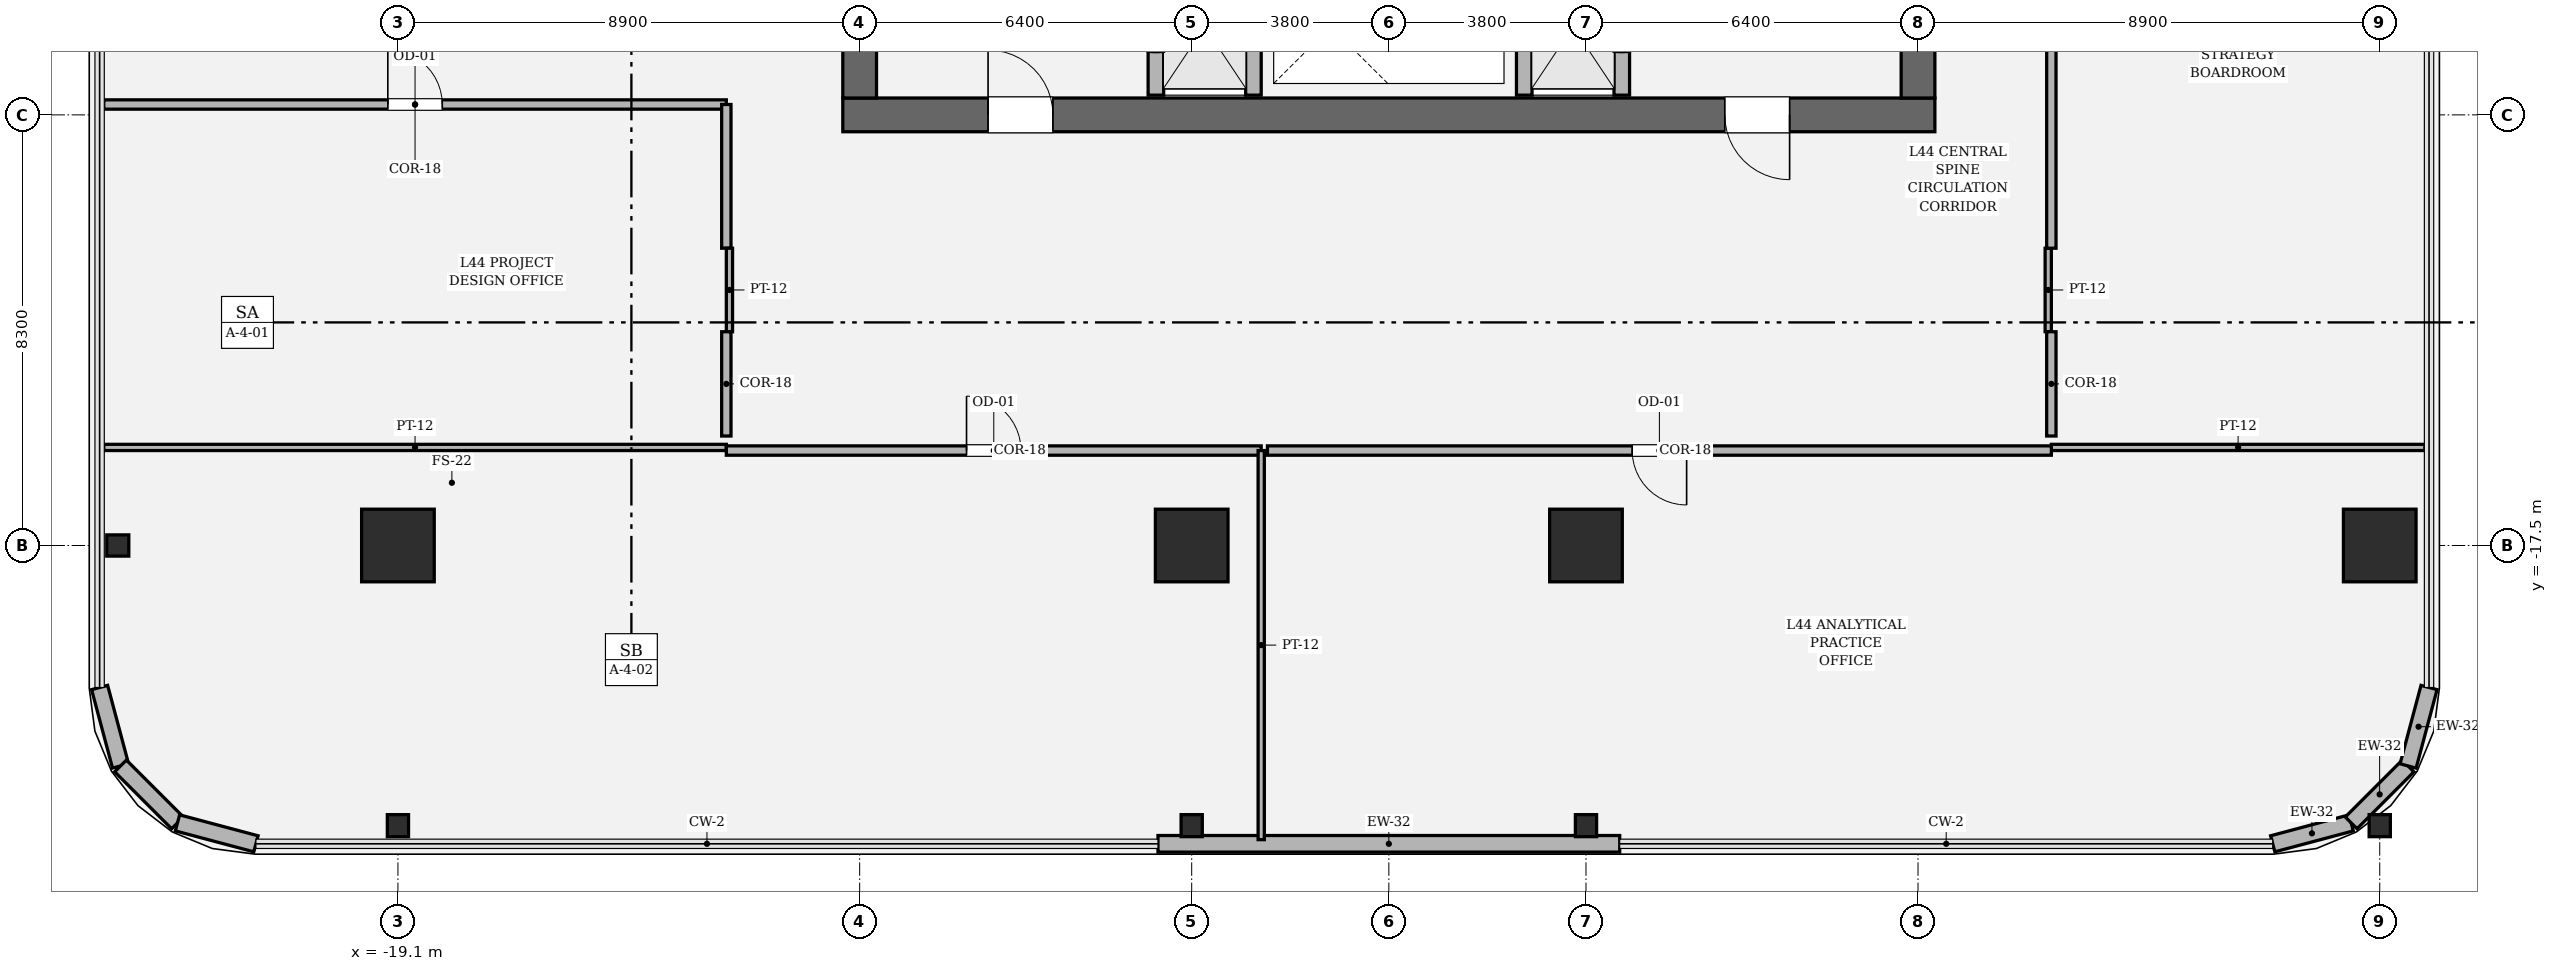
"""IFC4 building model, lengths in metres.
Left out: names, types, materials, properties, quantities, classifications, styles, units other than length and angle.
Written with IfcOpenShell. Run it as: python <this file> out.ifc"""

import sys

from ifc_helpers import new_model, si_unit, direction, frame, frame_2d, origin, origin_2d, place, context, subcontext, project, spatial, rectangle, hollow_rectangle, i_section, extrude, element, fill, save


model = new_model("IFC4")
c1 = context("Model", 3, precision=1e-05, world=origin(), true_north=direction((0.0, 1.0)))
c2 = subcontext(c1, "Body", "Model", "MODEL_VIEW")
j1 = project(units=[si_unit("LENGTHUNIT", "METRE"), si_unit("PLANEANGLEUNIT", "RADIAN")], contexts=[c1])
p1 = place(None, origin())
s1 = spatial("IfcSite", under=j1, at=p1, CompositionType="ELEMENT")
p2 = place(p1, origin())
s2 = spatial("IfcBuilding", under=s1, at=p2, CompositionType="ELEMENT")
p3 = place(p2, frame((0.0, 0.0, 188.4)))
s3 = spatial("IfcBuildingStorey", under=s2, at=p3, CompositionType="ELEMENT", Elevation=188.4)
p4 = place(p3, frame((10.525, -9.2, 0.0), z_axis=(0.0, 0.0, 1.0), x_axis=(-1.0, 0.0, 0.0)))
e1 = element("IfcWall", 1, at=p4, inside=s3, PredefinedType="SHEAR", context=c2, shape_type="SweptSolid", body=[
    extrude(rectangle(XDim=21.05, YDim=0.65, at=frame_2d((10.525, 0.0))), origin(), (0.0, 0.0, 1.0), 4.05),
])
p5 = place(p4, frame((2.8, 0.0, 0.0)))
e2 = element("IfcOpeningElement", 2, at=p5, cuts=e1, PredefinedType="OPENING", context=c2, shape_type="SweptSolid", body=[
    extrude(rectangle(XDim=1.25, YDim=2.25, at=frame_2d((0.625, 1.125))), frame((0.0, 0.335, 0.0), z_axis=(0.0, -1.0, 0.0), x_axis=(1.0, 0.0, 0.0)), (0.0, 0.0, 1.0), 0.67),
])
p6 = place(p4, frame((17.0, 0.0, 0.0)))
e3 = element("IfcOpeningElement", 3, at=p6, cuts=e1, PredefinedType="OPENING", context=c2, shape_type="SweptSolid", body=[
    extrude(rectangle(XDim=1.25, YDim=2.25, at=frame_2d((0.625, 1.125))), frame((0.0, 0.335, 0.0), z_axis=(0.0, -1.0, 0.0), x_axis=(1.0, 0.0, 0.0)), (0.0, 0.0, 1.0), 0.67),
])
p7 = place(p3, frame((-10.2, -8.875, 0.0), z_axis=(0.0, 0.0, 1.0), x_axis=(0.0, 1.0, 0.0)))
e4 = element("IfcWall", 4, at=p7, inside=s3, PredefinedType="SHEAR", context=c2, shape_type="SweptSolid", body=[
    extrude(rectangle(XDim=17.75, YDim=0.65, at=frame_2d((8.875, 0.0))), origin(), (0.0, 0.0, 1.0), 4.05),
])
p8 = place(p7, frame((12.665, 0.0, 0.0)))
e5 = element("IfcOpeningElement", 5, at=p8, cuts=e4, PredefinedType="OPENING", context=c2, shape_type="SweptSolid", body=[
    extrude(rectangle(XDim=1.18, YDim=2.2, at=frame_2d((0.59, 1.1))), frame((0.0, 0.335, 0.0), z_axis=(0.0, -1.0, 0.0), x_axis=(1.0, 0.0, 0.0)), (0.0, 0.0, 1.0), 0.67),
])
p9 = place(p3, frame((10.2, 8.875, 0.0), z_axis=(0.0, 0.0, 1.0), x_axis=(0.0, -1.0, 0.0)))
e6 = element("IfcWall", 6, at=p9, inside=s3, PredefinedType="SHEAR", context=c2, shape_type="SweptSolid", body=[
    extrude(rectangle(XDim=17.75, YDim=0.65, at=frame_2d((8.875, 0.0))), origin(), (0.0, 0.0, 1.0), 4.05),
])
p10 = place(p9, frame((3.905, 0.0, 0.0)))
e7 = element("IfcOpeningElement", 7, at=p10, cuts=e6, PredefinedType="OPENING", context=c2, shape_type="SweptSolid", body=[
    extrude(rectangle(XDim=1.18, YDim=2.2, at=frame_2d((0.59, 1.1))), frame((0.0, 0.335, 0.0), z_axis=(0.0, -1.0, 0.0), x_axis=(1.0, 0.0, 0.0)), (0.0, 0.0, 1.0), 0.67),
])
for number, where, z_axis, x_axis in (
    (8, (-19.1, -17.5, 0.0), (0.0, 0.0, 1.0), (1.0, 0.0, 0.0)),
    (9, (-3.8, -17.5, 0.0), (0.0, 0.0, 1.0), (1.0, 0.0, 0.0)),
    (10, (3.8, -17.5, 0.0), (0.0, 0.0, 1.0), (1.0, 0.0, 0.0)),
    (11, (19.1, -17.5, 0.0), (0.0, 0.0, 1.0), (1.0, 0.0, 0.0)),
):
    element("IfcColumn", number, at=place(p3, frame(where, z_axis=z_axis, x_axis=x_axis)), inside=s3, PredefinedType="COLUMN", context=c2, shape_type="SweptSolid", body=[
        extrude(hollow_rectangle(XDim=1.4, YDim=1.4, WallThickness=0.042, at=origin_2d()), origin(), (0.0, 0.0, 1.0), 4.05),
    ])
for number, where, z_axis, x_axis in (
    (12, (-19.1, -22.9, 0.0), (0.0, 0.0, 1.0), (1.0, 0.0, 0.0)),
    (13, (-3.8, -22.9, 0.0), (0.0, 0.0, 1.0), (1.0, 0.0, 0.0)),
    (14, (3.8, -22.9, 0.0), (0.0, 0.0, 1.0), (1.0, 0.0, 0.0)),
    (15, (19.1, -22.9, 0.0), (0.0, 0.0, 1.0), (1.0, 0.0, 0.0)),
    (16, (-24.5, -17.5, 0.0), (0.0, 0.0, 1.0), (0.0, 1.0, 0.0)),
):
    element("IfcColumn", number, at=place(p3, frame(where, z_axis=z_axis, x_axis=x_axis)), inside=s3, PredefinedType="COLUMN", context=c2, shape_type="SweptSolid", body=[
        extrude(i_section(OverallWidth=0.409, OverallDepth=0.425, WebThickness=0.032, FlangeThickness=0.052, FilletRadius=0.018, at=origin_2d()), origin(), (0.0, 0.0, 1.0), 4.048),
    ])
p11 = place(p3, frame((-4.45, -23.25, 0.0), z_axis=(0.0, 0.0, 1.0), x_axis=(1.0, 0.0, 0.0)))
e17 = element("IfcWall", 17, at=p11, inside=s3, PredefinedType="SOLIDWALL", context=c2, shape_type="SweptSolid", body=[
    extrude(rectangle(XDim=8.9, YDim=0.32, at=frame_2d((4.45, 0.0))), origin(), (0.0, 0.0, 1.0), 2.544),
])
p12 = place(p3, frame((17.037, -23.25, 0.0), z_axis=(0.0, 0.0, 1.0), x_axis=(0.966224582397, 0.257701486942, 0.0)))
e18 = element("IfcWall", 18, at=p12, inside=s3, PredefinedType="SOLIDWALL", context=c2, shape_type="SweptSolid", body=[
    extrude(rectangle(XDim=1.565, YDim=0.32, at=frame_2d((0.783, 0.0))), origin(), (0.0, 0.0, 1.0), 2.544),
])
p13 = place(p3, frame((18.549, -22.847, 0.0), z_axis=(0.0, 0.0, 1.0), x_axis=(0.707028130747, 0.707185422879, 0.0)))
e19 = element("IfcWall", 19, at=p13, inside=s3, PredefinedType="SOLIDWALL", context=c2, shape_type="SweptSolid", body=[
    extrude(rectangle(XDim=1.552, YDim=0.32, at=frame_2d((0.776, 0.0))), origin(), (0.0, 0.0, 1.0), 2.504),
])
for number, where, z_axis, x_axis in (
    (20, (19.646, -21.749, 0.0), (0.0, 0.0, 1.0), (0.258, 0.966, 0.0)),
    (21, (-24.85, -20.237, 0.0), (0.0, 0.0, 1.0), (0.258, -0.966, 0.0)),
):
    element("IfcWall", number, at=place(p3, frame(where, z_axis=z_axis, x_axis=x_axis)), inside=s3, PredefinedType="SOLIDWALL", context=c2, shape_type="SweptSolid", body=[
        extrude(rectangle(XDim=1.565, YDim=0.32, at=frame_2d((0.783, 0.0))), origin(), (0.0, 0.0, 1.0), 3.83),
    ])
p14 = place(p3, frame((-24.447, -21.749, 0.0), z_axis=(0.0, 0.0, 1.0), x_axis=(0.707028130747, -0.707185422879, 0.0)))
e22 = element("IfcWall", 22, at=p14, inside=s3, PredefinedType="SOLIDWALL", context=c2, shape_type="SweptSolid", body=[
    extrude(rectangle(XDim=1.552, YDim=0.32, at=frame_2d((0.776, 0.0))), origin(), (0.0, 0.0, 1.0), 3.83),
])
p15 = place(p3, frame((-23.349, -22.847, 0.0), z_axis=(0.0, 0.0, 1.0), x_axis=(0.966224582397, -0.257701486942, 0.0)))
e23 = element("IfcWall", 23, at=p15, inside=s3, PredefinedType="SOLIDWALL", context=c2, shape_type="SweptSolid", body=[
    extrude(rectangle(XDim=1.565, YDim=0.32, at=frame_2d((0.783, 0.0))), origin(), (0.0, 0.0, 1.0), 3.83),
])
p16 = place(p3, frame((-4.49, -8.82, 0.0), z_axis=(0.0, 0.0, 1.0), x_axis=(0.0, 1.0, 0.0)))
e24 = element("IfcWall", 24, at=p16, inside=s3, PredefinedType="SOLIDWALL", context=c2, shape_type="SweptSolid", body=[
    extrude(rectangle(XDim=2.77, YDim=0.3, at=frame_2d((1.385, 0.0))), origin(), (0.0, 0.0, 1.0), 3.83),
])
p17 = place(p16, frame((0.825, 0.0, 0.0)))
e25 = element("IfcOpeningElement", 25, at=p17, cuts=e24, PredefinedType="OPENING", context=c2, shape_type="SweptSolid", body=[
    extrude(rectangle(XDim=1.12, YDim=2.25, at=frame_2d((0.56, 1.125))), frame((0.0, 0.16, 0.0), z_axis=(0.0, -1.0, 0.0), x_axis=(1.0, 0.0, 0.0)), (0.0, 0.0, 1.0), 0.32),
])
p18 = place(p3, frame((-2.61, -8.82, 0.0), z_axis=(0.0, 0.0, 1.0), x_axis=(0.0, 1.0, 0.0)))
e26 = element("IfcWall", 26, at=p18, inside=s3, PredefinedType="SOLIDWALL", context=c2, shape_type="SweptSolid", body=[
    extrude(rectangle(XDim=2.77, YDim=0.3, at=frame_2d((1.385, 0.0))), origin(), (0.0, 0.0, 1.0), 3.83),
])
p19 = place(p3, frame((4.49, -8.82, 0.0), z_axis=(0.0, 0.0, 1.0), x_axis=(0.0, 1.0, 0.0)))
e27 = element("IfcWall", 27, at=p19, inside=s3, PredefinedType="SOLIDWALL", context=c2, shape_type="SweptSolid", body=[
    extrude(rectangle(XDim=2.77, YDim=0.3, at=frame_2d((1.385, 0.0))), origin(), (0.0, 0.0, 1.0), 3.83),
])
p20 = place(p19, frame((0.825, 0.0, 0.0)))
e28 = element("IfcOpeningElement", 28, at=p20, cuts=e27, PredefinedType="OPENING", context=c2, shape_type="SweptSolid", body=[
    extrude(rectangle(XDim=1.12, YDim=2.25, at=frame_2d((0.56, 1.125))), frame((0.0, 0.16, 0.0), z_axis=(0.0, -1.0, 0.0), x_axis=(1.0, 0.0, 0.0)), (0.0, 0.0, 1.0), 0.32),
])
p21 = place(p3, frame((2.61, -8.82, 0.0), z_axis=(0.0, 0.0, 1.0), x_axis=(0.0, 1.0, 0.0)))
e29 = element("IfcWall", 29, at=p21, inside=s3, PredefinedType="SOLIDWALL", context=c2, shape_type="SweptSolid", body=[
    extrude(rectangle(XDim=2.77, YDim=0.3, at=frame_2d((1.385, 0.0))), origin(), (0.0, 0.0, 1.0), 3.83),
])
p22 = place(p3, frame((-24.77, -15.61, 0.0), z_axis=(0.0, 0.0, 1.0), x_axis=(1.0, 0.0, 0.0)))
e30 = element("IfcWall", 30, at=p22, inside=s3, PredefinedType="PARTITIONING", context=c2, shape_type="SweptSolid", body=[
    extrude(rectangle(XDim=12.0, YDim=0.12, at=frame_2d((6.0, 0.0))), origin(), (0.0, 0.0, 1.0), 2.544),
])
p23 = place(p3, frame((-12.77, -15.67, 0.0), z_axis=(0.0, 0.0, 1.0), x_axis=(1.0, 0.0, 0.0)))
e31 = element("IfcWall", 31, at=p23, inside=s3, PredefinedType="PARTITIONING", context=c2, shape_type="SweptSolid", body=[
    extrude(rectangle(XDim=10.31, YDim=0.18, at=frame_2d((5.155, 0.0))), origin(), (0.0, 0.0, 1.0), 3.174),
])
p24 = place(p23, frame((4.63, 0.0, 0.0)))
e32 = element("IfcOpeningElement", 32, at=p24, cuts=e31, PredefinedType="OPENING", context=c2, shape_type="SweptSolid", body=[
    extrude(rectangle(XDim=1.05, YDim=2.2, at=frame_2d((0.525, 1.1))), frame((0.0, 0.1, 0.0), z_axis=(0.0, -1.0, 0.0), x_axis=(1.0, 0.0, 0.0)), (0.0, 0.0, 1.0), 0.2),
])
p25 = place(p3, frame((-2.46, -15.67, 0.0), z_axis=(0.0, 0.0, 1.0), x_axis=(0.0, -1.0, 0.0)))
e33 = element("IfcWall", 33, at=p25, inside=s3, PredefinedType="PARTITIONING", context=c2, shape_type="SweptSolid", body=[
    extrude(rectangle(XDim=7.5, YDim=0.12, at=frame_2d((3.75, 0.0))), origin(), (0.0, 0.0, 1.0), 2.544),
])
p26 = place(p3, frame((12.77, -15.61, 0.0), z_axis=(0.0, 0.0, 1.0), x_axis=(1.0, 0.0, 0.0)))
e34 = element("IfcWall", 34, at=p26, inside=s3, PredefinedType="PARTITIONING", context=c2, shape_type="SweptSolid", body=[
    extrude(rectangle(XDim=7.2, YDim=0.12, at=frame_2d((3.6, 0.0))), origin(), (0.0, 0.0, 1.0), 3.174),
])
p27 = place(p3, frame((-2.34, -15.67, 0.0), z_axis=(0.0, 0.0, 1.0), x_axis=(1.0, 0.0, 0.0)))
e35 = element("IfcWall", 35, at=p27, inside=s3, PredefinedType="PARTITIONING", context=c2, shape_type="SweptSolid", body=[
    extrude(rectangle(XDim=15.11, YDim=0.18, at=frame_2d((7.555, 0.0))), origin(), (0.0, 0.0, 1.0), 3.174),
])
p28 = place(p27, frame((7.03, 0.0, 0.0)))
e36 = element("IfcOpeningElement", 36, at=p28, cuts=e35, PredefinedType="OPENING", context=c2, shape_type="SweptSolid", body=[
    extrude(rectangle(XDim=1.05, YDim=2.2, at=frame_2d((0.525, 1.1))), frame((0.0, 0.1, 0.0), z_axis=(0.0, -1.0, 0.0), x_axis=(1.0, 0.0, 0.0)), (0.0, 0.0, 1.0), 0.2),
])
p29 = place(p3, frame((-24.77, -9.0, 0.0), z_axis=(0.0, 0.0, 1.0), x_axis=(1.0, 0.0, 0.0)))
e37 = element("IfcWall", 37, at=p29, inside=s3, PredefinedType="PARTITIONING", context=c2, shape_type="SweptSolid", body=[
    extrude(rectangle(XDim=12.0, YDim=0.18, at=frame_2d((6.0, 0.0))), origin(), (0.0, 0.0, 1.0), 2.544),
])
p30 = place(p29, frame((5.475, 0.0, 0.0)))
e38 = element("IfcOpeningElement", 38, at=p30, cuts=e37, PredefinedType="OPENING", context=c2, shape_type="SweptSolid", body=[
    extrude(rectangle(XDim=1.05, YDim=2.2, at=frame_2d((0.525, 1.1))), frame((0.0, 0.1, 0.0), z_axis=(0.0, -1.0, 0.0), x_axis=(1.0, 0.0, 0.0)), (0.0, 0.0, 1.0), 0.2),
])
p31 = place(p3, frame((-12.77, -9.0, 0.0), z_axis=(0.0, 0.0, 1.0), x_axis=(0.0, -1.0, 0.0)))
e39 = element("IfcWall", 39, at=p31, inside=s3, PredefinedType="PARTITIONING", context=c2, shape_type="SweptSolid", body=[
    extrude(rectangle(XDim=2.77, YDim=0.18, at=frame_2d((1.385, 0.0))), origin(), (0.0, 0.0, 1.0), 3.174),
])
p32 = place(p3, frame((-12.71, -11.77, 0.0), z_axis=(0.0, 0.0, 1.0), x_axis=(0.0, -1.0, 0.0)))
e40 = element("IfcWall", 40, at=p32, inside=s3, PredefinedType="PARTITIONING", context=c2, shape_type="SweptSolid", body=[
    extrude(rectangle(XDim=1.61, YDim=0.12, at=frame_2d((0.805, 0.0))), origin(), (0.0, 0.0, 1.0), 3.424),
])
p33 = place(p3, frame((-12.77, -13.38, 0.0), z_axis=(0.0, 0.0, 1.0), x_axis=(0.0, -1.0, 0.0)))
e41 = element("IfcWall", 41, at=p33, inside=s3, PredefinedType="PARTITIONING", context=c2, shape_type="SweptSolid", body=[
    extrude(rectangle(XDim=2.01, YDim=0.18, at=frame_2d((1.005, 0.0))), origin(), (0.0, 0.0, 1.0), 3.424),
])
p34 = place(p3, frame((12.71, -13.38, 0.0), z_axis=(0.0, 0.0, 1.0), x_axis=(0.0, 1.0, 0.0)))
e42 = element("IfcWall", 42, at=p34, inside=s3, PredefinedType="PARTITIONING", context=c2, shape_type="SweptSolid", body=[
    extrude(rectangle(XDim=1.61, YDim=0.12, at=frame_2d((0.805, 0.0))), origin(), (0.0, 0.0, 1.0), 3.424),
])
p35 = place(p3, frame((12.77, -11.77, 0.0), z_axis=(0.0, 0.0, 1.0), x_axis=(0.0, 1.0, 0.0)))
e43 = element("IfcWall", 43, at=p35, inside=s3, PredefinedType="PARTITIONING", context=c2, shape_type="SweptSolid", body=[
    extrude(rectangle(XDim=18.37, YDim=0.18, at=frame_2d((9.185, 0.0))), origin(), (0.0, 0.0, 1.0), 3.174),
])
p36 = place(p35, frame((8.485, 0.0, 0.0)))
e44 = element("IfcOpeningElement", 44, at=p36, cuts=e43, PredefinedType="OPENING", context=c2, shape_type="SweptSolid", body=[
    extrude(rectangle(XDim=1.4, YDim=2.25, at=frame_2d((0.7, 1.125))), frame((0.0, 0.1, 0.0), z_axis=(0.0, -1.0, 0.0), x_axis=(1.0, 0.0, 0.0)), (0.0, 0.0, 1.0), 0.2),
])
p37 = place(p3, frame((12.77, -15.39, 0.0), z_axis=(0.0, 0.0, 1.0), x_axis=(0.0, 1.0, 0.0)))
e45 = element("IfcWall", 45, at=p37, inside=s3, PredefinedType="PARTITIONING", context=c2, shape_type="SweptSolid", body=[
    extrude(rectangle(XDim=2.01, YDim=0.18, at=frame_2d((1.005, 0.0))), origin(), (0.0, 0.0, 1.0), 3.424),
])
p38 = place(p5, origin())
e46 = element("IfcDoor", 46, at=p38, inside=s3, OperationType="SINGLE_SWING_LEFT", PredefinedType="DOOR", context=c2, shape_type="SweptSolid", body=[
    extrude(rectangle(XDim=1.25, YDim=2.25, at=frame_2d((0.625, 1.125))), frame((0.0, 0.025, 0.0), z_axis=(0.0, -1.0, 0.0), x_axis=(1.0, 0.0, 0.0)), (0.0, 0.0, 1.0), 0.05),
])
fill(e2, e46)
p39 = place(p6, origin())
e47 = element("IfcDoor", 47, at=p39, inside=s3, OperationType="SINGLE_SWING_RIGHT", PredefinedType="DOOR", context=c2, shape_type="SweptSolid", body=[
    extrude(rectangle(XDim=1.25, YDim=2.25, at=frame_2d((0.625, 1.125))), frame((0.0, 0.025, 0.0), z_axis=(0.0, -1.0, 0.0), x_axis=(1.0, 0.0, 0.0)), (0.0, 0.0, 1.0), 0.05),
])
fill(e3, e47)
p40 = place(p24, origin())
e48 = element("IfcDoor", 48, at=p40, inside=s3, OperationType="SINGLE_SWING_LEFT", PredefinedType="DOOR", context=c2, shape_type="SweptSolid", body=[
    extrude(rectangle(XDim=1.05, YDim=2.2, at=frame_2d((0.525, 1.1))), frame((0.0, 0.025, 0.0), z_axis=(0.0, -1.0, 0.0), x_axis=(1.0, 0.0, 0.0)), (0.0, 0.0, 1.0), 0.05),
])
fill(e32, e48)
p41 = place(p28, origin())
e49 = element("IfcDoor", 49, at=p41, inside=s3, OperationType="SINGLE_SWING_RIGHT", PredefinedType="DOOR", context=c2, shape_type="SweptSolid", body=[
    extrude(rectangle(XDim=1.05, YDim=2.2, at=frame_2d((0.525, 1.1))), frame((0.0, 0.025, 0.0), z_axis=(0.0, -1.0, 0.0), x_axis=(1.0, 0.0, 0.0)), (0.0, 0.0, 1.0), 0.05),
])
fill(e36, e49)
p42 = place(p30, origin())
e50 = element("IfcDoor", 50, at=p42, inside=s3, OperationType="SINGLE_SWING_LEFT", PredefinedType="DOOR", context=c2, shape_type="SweptSolid", body=[
    extrude(rectangle(XDim=1.05, YDim=2.2, at=frame_2d((0.525, 1.1))), frame((0.0, 0.025, 0.0), z_axis=(0.0, -1.0, 0.0), x_axis=(1.0, 0.0, 0.0)), (0.0, 0.0, 1.0), 0.05),
])
fill(e38, e50)
save(model, sys.argv[1])
